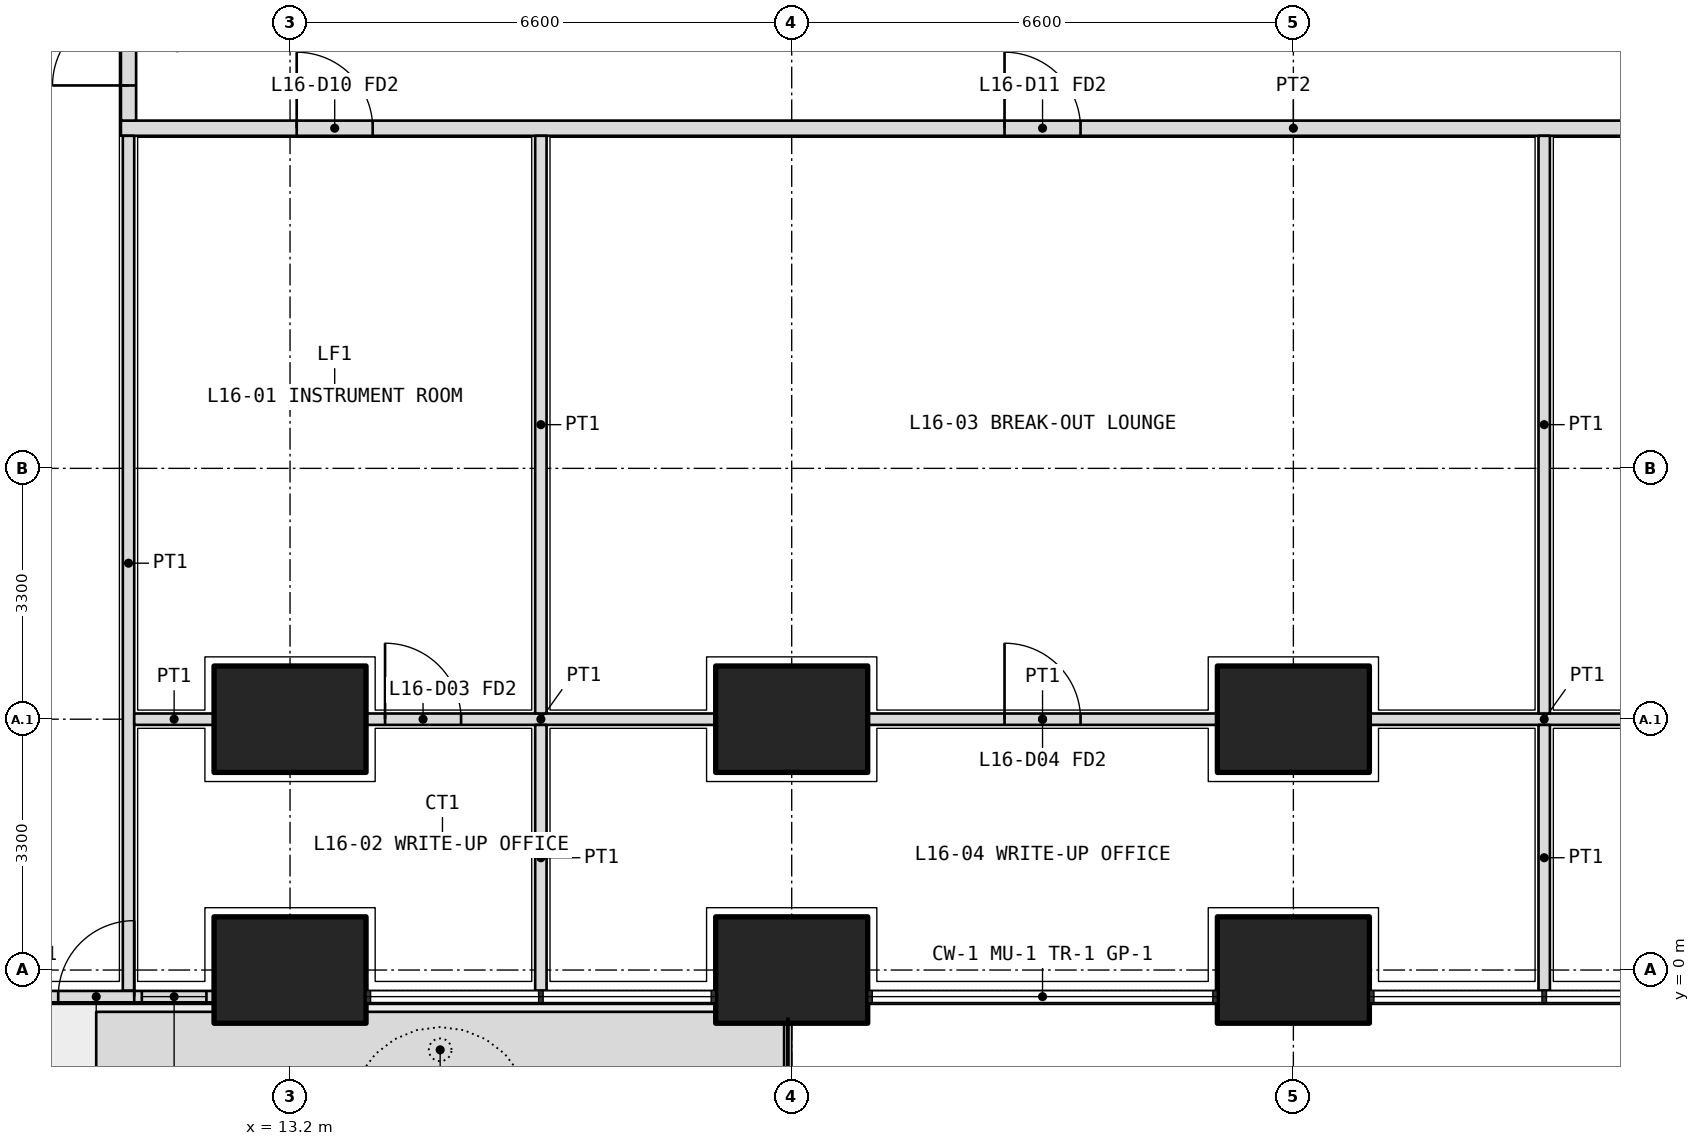
"""IFC4 building model, lengths in metres.
Left out: names, types, materials, properties, quantities, classifications, styles, units other than length and angle.
Written with IfcOpenShell. Run it as: python <this file> out.ifc"""

import sys

from ifc_helpers import new_model, si_unit, direction, frame, frame_2d, origin, origin_2d, place, context, subcontext, project, spatial, polyline, rectangle, outline, extrude, element, fill, save


model = new_model("IFC4")
c1 = context("Model", 3, precision=1e-05, world=origin(), true_north=direction((0.0, 1.0)))
c2 = subcontext(c1, "Body", "Model", "MODEL_VIEW")
j1 = project(units=[si_unit("LENGTHUNIT", "METRE"), si_unit("PLANEANGLEUNIT", "RADIAN")], contexts=[c1])
p1 = place(None, origin())
s1 = spatial("IfcSite", under=j1, at=p1, CompositionType="ELEMENT")
p2 = place(p1, origin())
s2 = spatial("IfcBuilding", under=s1, at=p2, CompositionType="ELEMENT")
p3 = place(p2, frame((0.0, 0.0, 71.7)))
s3 = spatial("IfcBuildingStorey", under=s2, at=p3, CompositionType="ELEMENT", Elevation=71.7)
for number, where, z_axis, x_axis in (
    (1, (13.2, 0.0, 0.0), (0.0, 0.0, 1.0), (1.0, 0.0, 0.0)),
    (2, (19.8, 0.0, 0.0), (0.0, 0.0, 1.0), (1.0, 0.0, 0.0)),
    (3, (26.4, 0.0, 0.0), (0.0, 0.0, 1.0), (1.0, 0.0, 0.0)),
    (4, (13.2, 3.3, 0.0), (0.0, 0.0, 1.0), (1.0, 0.0, 0.0)),
    (5, (19.8, 3.3, 0.0), (0.0, 0.0, 1.0), (1.0, 0.0, 0.0)),
    (6, (26.4, 3.3, 0.0), (0.0, 0.0, 1.0), (1.0, 0.0, 0.0)),
):
    element("IfcColumn", number, at=place(p3, frame(where, z_axis=z_axis, x_axis=x_axis)), inside=s3, PredefinedType="COLUMN", context=c2, shape_type="SweptSolid", body=[
        extrude(rectangle(XDim=2.0, YDim=1.4, at=origin_2d()), origin(), (0.0, 0.0, 1.0), 4.2),
    ])
p4 = place(p3, origin())
e7 = element("IfcWall", 7, at=p4, inside=s3, PredefinedType="USERDEFINED", context=c2, shape_type="SweptSolid", body=[
    extrude(outline(polyline([(10.65, -1.55), (19.7, -1.55), (19.7, -0.55), (10.65, -0.55), (10.65, -1.55)]), holes=[polyline([(10.8, -1.4), (19.55, -1.4), (19.55, -0.7), (10.8, -0.7), (10.8, -1.4)])]), origin(), (0.0, 0.0, 1.0), 1.05),
])
p5 = place(p3, frame((7.6, -0.35, 0.0), z_axis=(0.0, 0.0, 1.0), x_axis=(1.0, 0.0, 0.0)))
e8 = element("IfcWall", 8, at=p5, inside=s3, PredefinedType="SOLIDWALL", context=c2, shape_type="SweptSolid", body=[
    extrude(rectangle(XDim=4.6, YDim=0.15, at=frame_2d((2.3, 0.0))), origin(), (0.0, 0.0, 1.0), 2.05),
])
p6 = place(p5, frame((2.55, 0.0, 0.0)))
e9 = element("IfcOpeningElement", 9, at=p6, cuts=e8, PredefinedType="OPENING", context=c2, shape_type="SweptSolid", body=[
    extrude(rectangle(XDim=1.0, YDim=2.0, at=frame_2d((0.5, 1.0))), frame((0.0, 0.085, 0.0), z_axis=(0.0, -1.0, 0.0), x_axis=(1.0, 0.0, 0.0)), (0.0, 0.0, 1.0), 0.17),
])
p7 = place(p5, frame((0.1, 0.0, 0.1)))
e10 = element("IfcOpeningElement", 10, at=p7, cuts=e8, PredefinedType="OPENING", context=c2, shape_type="SweptSolid", body=[
    extrude(rectangle(XDim=1.95, YDim=1.65, at=frame_2d((0.975, 0.825))), frame((0.0, 0.085, 0.0), z_axis=(0.0, -1.0, 0.0), x_axis=(1.0, 0.0, 0.0)), (0.0, 0.0, 1.0), 0.17),
])
p8 = place(p5, frame((3.65, 0.0, 0.1)))
e11 = element("IfcOpeningElement", 11, at=p8, cuts=e8, PredefinedType="OPENING", context=c2, shape_type="SweptSolid", body=[
    extrude(rectangle(XDim=0.85, YDim=1.65, at=frame_2d((0.425, 0.825))), frame((0.0, 0.085, 0.0), z_axis=(0.0, -1.0, 0.0), x_axis=(1.0, 0.0, 0.0)), (0.0, 0.0, 1.0), 0.17),
])
p9 = place(p3, frame((10.975, 11.075, 0.0), z_axis=(0.0, 0.0, 1.0), x_axis=(1.0, 0.0, 0.0)))
e12 = element("IfcWall", 12, at=p9, inside=s3, PredefinedType="PARTITIONING", context=c2, shape_type="SweptSolid", body=[
    extrude(rectangle(XDim=30.85, YDim=0.2, at=frame_2d((15.425, 0.0))), origin(), (0.0, 0.0, 1.0), 2.55),
])
p10 = place(p9, frame((2.312, 0.0, 0.0)))
e13 = element("IfcOpeningElement", 13, at=p10, cuts=e12, PredefinedType="OPENING", context=c2, shape_type="SweptSolid", body=[
    extrude(rectangle(XDim=1.0, YDim=2.1, at=frame_2d((0.5, 1.05))), frame((0.0, 0.11, 0.0), z_axis=(0.0, -1.0, 0.0), x_axis=(1.0, 0.0, 0.0)), (0.0, 0.0, 1.0), 0.22),
])
p11 = place(p9, frame((11.625, 0.0, 0.0)))
e14 = element("IfcOpeningElement", 14, at=p11, cuts=e12, PredefinedType="OPENING", context=c2, shape_type="SweptSolid", body=[
    extrude(rectangle(XDim=1.0, YDim=2.1, at=frame_2d((0.5, 1.05))), frame((0.0, 0.11, 0.0), z_axis=(0.0, -1.0, 0.0), x_axis=(1.0, 0.0, 0.0)), (0.0, 0.0, 1.0), 0.22),
])
p12 = place(p9, frame((23.075, 0.0, 0.0)))
e15 = element("IfcOpeningElement", 15, at=p12, cuts=e12, PredefinedType="OPENING", context=c2, shape_type="SweptSolid", body=[
    extrude(rectangle(XDim=1.2, YDim=2.1, at=frame_2d((0.6, 1.05))), frame((0.0, 0.11, 0.0), z_axis=(0.0, -1.0, 0.0), x_axis=(1.0, 0.0, 0.0)), (0.0, 0.0, 1.0), 0.22),
])
p13 = place(p9, frame((29.188, 0.0, 0.0)))
e16 = element("IfcOpeningElement", 16, at=p13, cuts=e12, PredefinedType="OPENING", context=c2, shape_type="SweptSolid", body=[
    extrude(rectangle(XDim=1.0, YDim=2.1, at=frame_2d((0.5, 1.05))), frame((0.0, 0.11, 0.0), z_axis=(0.0, -1.0, 0.0), x_axis=(1.0, 0.0, 0.0)), (0.0, 0.0, 1.0), 0.22),
])
p14 = place(p3, frame((11.075, 11.175, 0.0), z_axis=(0.0, 0.0, 1.0), x_axis=(0.0, 1.0, 0.0)))
e17 = element("IfcWall", 17, at=p14, inside=s3, PredefinedType="PARTITIONING", context=c2, shape_type="SweptSolid", body=[
    extrude(rectangle(XDim=23.85, YDim=0.2, at=frame_2d((11.925, 0.0))), origin(), (0.0, 0.0, 1.0), 2.55),
])
p15 = place(p14, frame((0.462, 0.0, 0.0)))
e18 = element("IfcOpeningElement", 18, at=p15, cuts=e17, PredefinedType="OPENING", context=c2, shape_type="SweptSolid", body=[
    extrude(rectangle(XDim=1.0, YDim=2.1, at=frame_2d((0.5, 1.05))), frame((0.0, 0.11, 0.0), z_axis=(0.0, -1.0, 0.0), x_axis=(1.0, 0.0, 0.0)), (0.0, 0.0, 1.0), 0.22),
])
p16 = place(p14, frame((2.575, 0.0, 0.0)))
e19 = element("IfcOpeningElement", 19, at=p16, cuts=e17, PredefinedType="OPENING", context=c2, shape_type="SweptSolid", body=[
    extrude(rectangle(XDim=1.0, YDim=2.1, at=frame_2d((0.5, 1.05))), frame((0.0, 0.11, 0.0), z_axis=(0.0, -1.0, 0.0), x_axis=(1.0, 0.0, 0.0)), (0.0, 0.0, 1.0), 0.22),
])
p17 = place(p14, frame((5.625, 0.0, 0.0)))
e20 = element("IfcOpeningElement", 20, at=p17, cuts=e17, PredefinedType="OPENING", context=c2, shape_type="SweptSolid", body=[
    extrude(rectangle(XDim=0.9, YDim=2.1, at=frame_2d((0.45, 1.05))), frame((0.0, 0.11, 0.0), z_axis=(0.0, -1.0, 0.0), x_axis=(1.0, 0.0, 0.0)), (0.0, 0.0, 1.0), 0.22),
])
p18 = place(p14, frame((9.425, 0.0, 0.0)))
e21 = element("IfcOpeningElement", 21, at=p18, cuts=e17, PredefinedType="OPENING", context=c2, shape_type="SweptSolid", body=[
    extrude(rectangle(XDim=0.9, YDim=2.1, at=frame_2d((0.45, 1.05))), frame((0.0, 0.11, 0.0), z_axis=(0.0, -1.0, 0.0), x_axis=(1.0, 0.0, 0.0)), (0.0, 0.0, 1.0), 0.22),
])
p19 = place(p14, frame((12.975, 0.0, 0.0)))
e22 = element("IfcOpeningElement", 22, at=p19, cuts=e17, PredefinedType="OPENING", context=c2, shape_type="SweptSolid", body=[
    extrude(rectangle(XDim=1.0, YDim=2.1, at=frame_2d((0.5, 1.05))), frame((0.0, 0.11, 0.0), z_axis=(0.0, -1.0, 0.0), x_axis=(1.0, 0.0, 0.0)), (0.0, 0.0, 1.0), 0.22),
])
p20 = place(p14, frame((18.025, 0.0, 0.0)))
e23 = element("IfcOpeningElement", 23, at=p20, cuts=e17, PredefinedType="OPENING", context=c2, shape_type="SweptSolid", body=[
    extrude(rectangle(XDim=1.0, YDim=2.1, at=frame_2d((0.5, 1.05))), frame((0.0, 0.11, 0.0), z_axis=(0.0, -1.0, 0.0), x_axis=(1.0, 0.0, 0.0)), (0.0, 0.0, 1.0), 0.22),
])
p21 = place(p14, frame((22.387, 0.0, 0.0)))
e24 = element("IfcOpeningElement", 24, at=p21, cuts=e17, PredefinedType="OPENING", context=c2, shape_type="SweptSolid", body=[
    extrude(rectangle(XDim=1.0, YDim=2.1, at=frame_2d((0.5, 1.05))), frame((0.0, 0.11, 0.0), z_axis=(0.0, -1.0, 0.0), x_axis=(1.0, 0.0, 0.0)), (0.0, 0.0, 1.0), 0.22),
])
p22 = place(p3, frame((11.075, -0.27, 0.0), z_axis=(0.0, 0.0, 1.0), x_axis=(0.0, 1.0, 0.0)))
e25 = element("IfcWall", 25, at=p22, inside=s3, PredefinedType="PARTITIONING", context=c2, shape_type="SweptSolid", body=[
    extrude(rectangle(XDim=11.245, YDim=0.15, at=frame_2d((5.623, 0.0))), origin(), (0.0, 0.0, 1.0), 3.85),
])
p23 = place(p3, frame((11.15, 3.3, 0.0), z_axis=(0.0, 0.0, 1.0), x_axis=(1.0, 0.0, 0.0)))
e26 = element("IfcWall", 26, at=p23, inside=s3, PredefinedType="PARTITIONING", context=c2, shape_type="SweptSolid", body=[
    extrude(rectangle(XDim=1.05, YDim=0.15, at=frame_2d((0.525, 0.0))), origin(), (0.0, 0.0, 1.0), 2.55),
])
p24 = place(p3, frame((14.2, 3.3, 0.0), z_axis=(0.0, 0.0, 1.0), x_axis=(1.0, 0.0, 0.0)))
e27 = element("IfcWall", 27, at=p24, inside=s3, PredefinedType="PARTITIONING", context=c2, shape_type="SweptSolid", body=[
    extrude(rectangle(XDim=4.6, YDim=0.15, at=frame_2d((2.3, 0.0))), origin(), (0.0, 0.0, 1.0), 2.55),
])
p25 = place(p24, frame((0.25, 0.0, 0.0)))
e28 = element("IfcOpeningElement", 28, at=p25, cuts=e27, PredefinedType="OPENING", context=c2, shape_type="SweptSolid", body=[
    extrude(rectangle(XDim=1.0, YDim=2.1, at=frame_2d((0.5, 1.05))), frame((0.0, 0.085, 0.0), z_axis=(0.0, -1.0, 0.0), x_axis=(1.0, 0.0, 0.0)), (0.0, 0.0, 1.0), 0.17),
])
p26 = place(p3, frame((20.8, 3.3, 0.0), z_axis=(0.0, 0.0, 1.0), x_axis=(1.0, 0.0, 0.0)))
e29 = element("IfcWall", 29, at=p26, inside=s3, PredefinedType="PARTITIONING", context=c2, shape_type="SweptSolid", body=[
    extrude(rectangle(XDim=4.6, YDim=0.15, at=frame_2d((2.3, 0.0))), origin(), (0.0, 0.0, 1.0), 2.55),
])
p27 = place(p26, frame((1.8, 0.0, 0.0)))
e30 = element("IfcOpeningElement", 30, at=p27, cuts=e29, PredefinedType="OPENING", context=c2, shape_type="SweptSolid", body=[
    extrude(rectangle(XDim=1.0, YDim=2.1, at=frame_2d((0.5, 1.05))), frame((0.0, 0.085, 0.0), z_axis=(0.0, -1.0, 0.0), x_axis=(1.0, 0.0, 0.0)), (0.0, 0.0, 1.0), 0.17),
])
p28 = place(p3, frame((27.4, 3.3, 0.0), z_axis=(0.0, 0.0, 1.0), x_axis=(1.0, 0.0, 0.0)))
e31 = element("IfcWall", 31, at=p28, inside=s3, PredefinedType="PARTITIONING", context=c2, shape_type="SweptSolid", body=[
    extrude(rectangle(XDim=4.6, YDim=0.15, at=frame_2d((2.3, 0.0))), origin(), (0.0, 0.0, 1.0), 2.55),
])
p29 = place(p3, frame((16.5, -0.27, 0.0), z_axis=(0.0, 0.0, 1.0), x_axis=(0.0, 1.0, 0.0)))
e32 = element("IfcWall", 32, at=p29, inside=s3, PredefinedType="PARTITIONING", context=c2, shape_type="SweptSolid", body=[
    extrude(rectangle(XDim=3.495, YDim=0.15, at=frame_2d((1.748, 0.0))), origin(), (0.0, 0.0, 1.0), 3.85),
])
p30 = place(p3, frame((16.5, 3.375, 0.0), z_axis=(0.0, 0.0, 1.0), x_axis=(0.0, 1.0, 0.0)))
e33 = element("IfcWall", 33, at=p30, inside=s3, PredefinedType="PARTITIONING", context=c2, shape_type="SweptSolid", body=[
    extrude(rectangle(XDim=7.6, YDim=0.15, at=frame_2d((3.8, 0.0))), origin(), (0.0, 0.0, 1.0), 3.85),
])
p31 = place(p3, frame((29.7, -0.27, 0.0), z_axis=(0.0, 0.0, 1.0), x_axis=(0.0, 1.0, 0.0)))
e34 = element("IfcWall", 34, at=p31, inside=s3, PredefinedType="PARTITIONING", context=c2, shape_type="SweptSolid", body=[
    extrude(rectangle(XDim=3.495, YDim=0.15, at=frame_2d((1.748, 0.0))), origin(), (0.0, 0.0, 1.0), 3.85),
])
p32 = place(p3, frame((29.7, 3.375, 0.0), z_axis=(0.0, 0.0, 1.0), x_axis=(0.0, 1.0, 0.0)))
e35 = element("IfcWall", 35, at=p32, inside=s3, PredefinedType="PARTITIONING", context=c2, shape_type="SweptSolid", body=[
    extrude(rectangle(XDim=7.6, YDim=0.15, at=frame_2d((3.8, 0.0))), origin(), (0.0, 0.0, 1.0), 3.85),
])
p33 = place(p6, origin())
e36 = element("IfcDoor", 36, at=p33, inside=s3, OperationType="SINGLE_SWING_RIGHT", PredefinedType="DOOR", context=c2, shape_type="SweptSolid", body=[
    extrude(rectangle(XDim=1.0, YDim=2.0, at=frame_2d((0.5, 1.0))), frame((0.0, 0.025, 0.0), z_axis=(0.0, -1.0, 0.0), x_axis=(1.0, 0.0, 0.0)), (0.0, 0.0, 1.0), 0.05),
])
fill(e9, e36)
p34 = place(p8, origin())
e37 = element("IfcWindow", 37, at=p34, inside=s3, PartitioningType="SINGLE_PANEL", PredefinedType="WINDOW", context=c2, shape_type="SweptSolid", body=[
    extrude(rectangle(XDim=0.85, YDim=1.65, at=frame_2d((0.425, 0.825))), frame((0.0, 0.03, 0.0), z_axis=(0.0, -1.0, 0.0), x_axis=(1.0, 0.0, 0.0)), (0.0, 0.0, 1.0), 0.06),
])
fill(e11, e37)
p35 = place(p10, origin())
e38 = element("IfcDoor", 38, at=p35, inside=s3, OperationType="SINGLE_SWING_LEFT", PredefinedType="DOOR", context=c2, shape_type="SweptSolid", body=[
    extrude(rectangle(XDim=1.0, YDim=2.1, at=frame_2d((0.5, 1.05))), frame((0.0, 0.025, 0.0), z_axis=(0.0, -1.0, 0.0), x_axis=(1.0, 0.0, 0.0)), (0.0, 0.0, 1.0), 0.05),
])
fill(e13, e38)
p36 = place(p25, origin())
e39 = element("IfcDoor", 39, at=p36, inside=s3, OperationType="SINGLE_SWING_LEFT", PredefinedType="DOOR", context=c2, shape_type="SweptSolid", body=[
    extrude(rectangle(XDim=1.0, YDim=2.1, at=frame_2d((0.5, 1.05))), frame((0.0, 0.025, 0.0), z_axis=(0.0, -1.0, 0.0), x_axis=(1.0, 0.0, 0.0)), (0.0, 0.0, 1.0), 0.05),
])
fill(e28, e39)
p37 = place(p11, origin())
e40 = element("IfcDoor", 40, at=p37, inside=s3, OperationType="SINGLE_SWING_LEFT", PredefinedType="DOOR", context=c2, shape_type="SweptSolid", body=[
    extrude(rectangle(XDim=1.0, YDim=2.1, at=frame_2d((0.5, 1.05))), frame((0.0, 0.025, 0.0), z_axis=(0.0, -1.0, 0.0), x_axis=(1.0, 0.0, 0.0)), (0.0, 0.0, 1.0), 0.05),
])
fill(e14, e40)
p38 = place(p27, origin())
e41 = element("IfcDoor", 41, at=p38, inside=s3, OperationType="SINGLE_SWING_LEFT", PredefinedType="DOOR", context=c2, shape_type="SweptSolid", body=[
    extrude(rectangle(XDim=1.0, YDim=2.1, at=frame_2d((0.5, 1.05))), frame((0.0, 0.025, 0.0), z_axis=(0.0, -1.0, 0.0), x_axis=(1.0, 0.0, 0.0)), (0.0, 0.0, 1.0), 0.05),
])
fill(e30, e41)
p39 = place(p15, origin())
e42 = element("IfcDoor", 42, at=p39, inside=s3, OperationType="SINGLE_SWING_LEFT", PredefinedType="DOOR", context=c2, shape_type="SweptSolid", body=[
    extrude(rectangle(XDim=1.0, YDim=2.1, at=frame_2d((0.5, 1.05))), frame((0.0, 0.025, 0.0), z_axis=(0.0, -1.0, 0.0), x_axis=(1.0, 0.0, 0.0)), (0.0, 0.0, 1.0), 0.05),
])
fill(e18, e42)
save(model, sys.argv[1])
